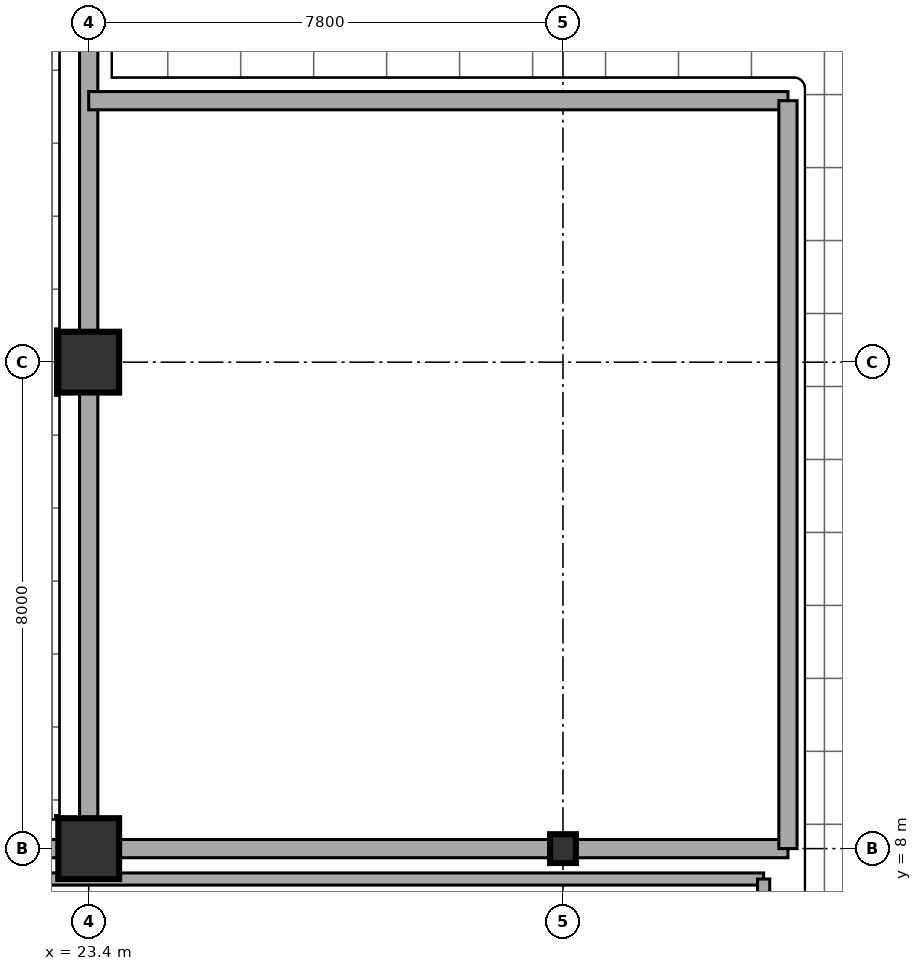
"""IFC4 building model, lengths in metres.
Left out: names, types, materials, properties, quantities, classifications, styles, units other than length and angle.
Written with IfcOpenShell. Run it as: python <this file> out.ifc"""

import sys

from ifc_helpers import new_model, si_unit, direction, frame, frame_2d, origin, origin_2d, place, context, subcontext, project, spatial, rectangle, i_section, extrude, element, fill, save


model = new_model("IFC4")
c1 = context("Model", 3, precision=1e-05, world=origin(), true_north=direction((0.0, 1.0)))
c2 = subcontext(c1, "Body", "Model", "MODEL_VIEW")
j1 = project(units=[si_unit("LENGTHUNIT", "METRE"), si_unit("PLANEANGLEUNIT", "RADIAN")], contexts=[c1])
p1 = place(None, origin())
s1 = spatial("IfcSite", under=j1, at=p1, CompositionType="ELEMENT")
p2 = place(p1, origin())
s2 = spatial("IfcBuilding", under=s1, at=p2, CompositionType="ELEMENT")
p3 = place(p2, origin())
s3 = spatial("IfcBuildingStorey", under=s2, at=p3, CompositionType="ELEMENT", Elevation=0.0)
for number, where, z_axis, x_axis in (
    (1, (23.4, 8.0, 0.0), (0.0, 0.0, 1.0), (1.0, 0.0, 0.0)),
    (2, (23.4, 16.0, 0.0), (0.0, 0.0, 1.0), (1.0, 0.0, 0.0)),
):
    element("IfcColumn", number, at=place(p3, frame(where, z_axis=z_axis, x_axis=x_axis)), inside=s3, PredefinedType="COLUMN", context=c2, shape_type="SweptSolid", body=[
        extrude(rectangle(XDim=1.0, YDim=1.0, at=origin_2d()), origin(), (0.0, 0.0, 1.0), 5.395),
    ])
p4 = place(p3, frame((31.2, 8.0, 0.0), z_axis=(0.0, 0.0, 1.0), x_axis=(1.0, 0.0, 0.0)))
e3 = element("IfcColumn", 3, at=p4, inside=s3, PredefinedType="COLUMN", context=c2, shape_type="SweptSolid", body=[
    extrude(i_section(OverallWidth=0.424, OverallDepth=0.474, WebThickness=0.048, FlangeThickness=0.077, at=origin_2d()), origin(), (0.0, 0.0, 1.0), 5.395),
])
p5 = place(p3, frame((23.4, 8.0, 0.0), z_axis=(0.0, 0.0, 1.0), x_axis=(0.0, 1.0, 0.0)))
e4 = element("IfcWall", 4, at=p5, inside=s3, PredefinedType="PARTITIONING", context=c2, shape_type="SweptSolid", body=[
    extrude(rectangle(XDim=16.0, YDim=0.3, at=frame_2d((8.0, 0.0))), origin(), (0.0, 0.0, 1.0), 3.688),
])
p6 = place(p5, frame((12.8, 0.0, 0.0)))
e5 = element("IfcOpeningElement", 5, at=p6, cuts=e4, PredefinedType="OPENING", context=c2, shape_type="SweptSolid", body=[
    extrude(rectangle(XDim=1.8, YDim=2.4, at=frame_2d((0.9, 1.2))), frame((0.0, 0.16, 0.0), z_axis=(0.0, -1.0, 0.0), x_axis=(1.0, 0.0, 0.0)), (0.0, 0.0, 1.0), 0.32),
])
p7 = place(p3, frame((0.15, 8.0, 0.0), z_axis=(0.0, 0.0, 1.0), x_axis=(1.0, 0.0, 0.0)))
e6 = element("IfcWall", 6, at=p7, inside=s3, PredefinedType="PARTITIONING", context=c2, shape_type="SweptSolid", body=[
    extrude(rectangle(XDim=23.25, YDim=0.3, at=frame_2d((11.625, 0.0))), origin(), (0.0, 0.0, 1.0), 3.688),
])
p8 = place(p7, frame((3.2, 0.0, 0.0)))
e7 = element("IfcOpeningElement", 7, at=p8, cuts=e6, PredefinedType="OPENING", context=c2, shape_type="SweptSolid", body=[
    extrude(rectangle(XDim=0.95, YDim=2.15, at=frame_2d((0.475, 1.075))), frame((0.0, 0.16, 0.0), z_axis=(0.0, -1.0, 0.0), x_axis=(1.0, 0.0, 0.0)), (0.0, 0.0, 1.0), 0.32),
])
p9 = place(p3, frame((23.4, 20.3, 0.0), z_axis=(0.0, 0.0, 1.0), x_axis=(1.0, 0.0, 0.0)))
e8 = element("IfcWall", 8, at=p9, inside=s3, PredefinedType="PARTITIONING", context=c2, shape_type="SweptSolid", body=[
    extrude(rectangle(XDim=11.5, YDim=0.3, at=frame_2d((5.75, 0.0))), origin(), (0.0, 0.0, 1.0), 3.688),
])
p10 = place(p9, frame((2.2, 0.0, 0.0)))
e9 = element("IfcOpeningElement", 9, at=p10, cuts=e8, PredefinedType="OPENING", context=c2, shape_type="SweptSolid", body=[
    extrude(rectangle(XDim=1.8, YDim=2.4, at=frame_2d((0.9, 1.2))), frame((0.0, 0.16, 0.0), z_axis=(0.0, -1.0, 0.0), x_axis=(1.0, 0.0, 0.0)), (0.0, 0.0, 1.0), 0.32),
])
p11 = place(p9, frame((8.4, 0.0, 0.0)))
e10 = element("IfcOpeningElement", 10, at=p11, cuts=e8, PredefinedType="OPENING", context=c2, shape_type="SweptSolid", body=[
    extrude(rectangle(XDim=1.6, YDim=2.4, at=frame_2d((0.8, 1.2))), frame((0.0, 0.16, 0.0), z_axis=(0.0, -1.0, 0.0), x_axis=(1.0, 0.0, 0.0)), (0.0, 0.0, 1.0), 0.32),
])
p12 = place(p3, frame((23.4, 8.0, 0.0), z_axis=(0.0, 0.0, 1.0), x_axis=(1.0, 0.0, 0.0)))
e11 = element("IfcWall", 11, at=p12, inside=s3, PredefinedType="PARTITIONING", context=c2, shape_type="SweptSolid", body=[
    extrude(rectangle(XDim=11.5, YDim=0.3, at=frame_2d((5.75, 0.0))), origin(), (0.0, 0.0, 1.0), 3.688),
])
p13 = place(p3, frame((34.9, 8.0, 0.0), z_axis=(0.0, 0.0, 1.0), x_axis=(0.0, 1.0, 0.0)))
e12 = element("IfcWall", 12, at=p13, inside=s3, PredefinedType="PARTITIONING", context=c2, shape_type="SweptSolid", body=[
    extrude(rectangle(XDim=12.3, YDim=0.3, at=frame_2d((6.15, 0.0))), origin(), (0.0, 0.0, 1.0), 3.688),
])
p14 = place(p13, frame((4.2, 0.0, 0.0)))
e13 = element("IfcOpeningElement", 13, at=p14, cuts=e12, PredefinedType="OPENING", context=c2, shape_type="SweptSolid", body=[
    extrude(rectangle(XDim=1.05, YDim=2.15, at=frame_2d((0.525, 1.075))), frame((0.0, 0.16, 0.0), z_axis=(0.0, -1.0, 0.0), x_axis=(1.0, 0.0, 0.0)), (0.0, 0.0, 1.0), 0.32),
])
p15 = place(p3, frame((7.8, 7.5, 0.0), z_axis=(0.0, 0.0, 1.0), x_axis=(1.0, 0.0, 0.0)))
e14 = element("IfcWall", 14, at=p15, inside=s3, PredefinedType="SOLIDWALL", context=c2, shape_type="SweptSolid", body=[
    extrude(rectangle(XDim=26.7, YDim=0.2, at=frame_2d((13.35, 0.0))), origin(), (0.0, 0.0, 1.0), 4.415),
])
p16 = place(p3, frame((34.5, 1.3, 0.0), z_axis=(0.0, 0.0, 1.0), x_axis=(0.0, 1.0, 0.0)))
e15 = element("IfcWall", 15, at=p16, inside=s3, PredefinedType="SOLIDWALL", context=c2, shape_type="SweptSolid", body=[
    extrude(rectangle(XDim=6.2, YDim=0.2, at=frame_2d((3.1, 0.0))), origin(), (0.0, 0.0, 1.0), 4.701),
])
p17 = place(p6, origin())
e16 = element("IfcDoor", 16, at=p17, inside=s3, OperationType="SINGLE_SWING_LEFT", PredefinedType="DOOR", context=c2, shape_type="SweptSolid", body=[
    extrude(rectangle(XDim=1.8, YDim=2.4, at=frame_2d((0.9, 1.2))), frame((0.0, 0.025, 0.0), z_axis=(0.0, -1.0, 0.0), x_axis=(1.0, 0.0, 0.0)), (0.0, 0.0, 1.0), 0.05),
])
fill(e5, e16)
p18 = place(p10, origin())
e17 = element("IfcDoor", 17, at=p18, inside=s3, OperationType="SINGLE_SWING_LEFT", PredefinedType="DOOR", context=c2, shape_type="SweptSolid", body=[
    extrude(rectangle(XDim=1.8, YDim=2.4, at=frame_2d((0.9, 1.2))), frame((0.0, 0.025, 0.0), z_axis=(0.0, -1.0, 0.0), x_axis=(1.0, 0.0, 0.0)), (0.0, 0.0, 1.0), 0.05),
])
fill(e9, e17)
p19 = place(p11, origin())
e18 = element("IfcDoor", 18, at=p19, inside=s3, OperationType="SINGLE_SWING_LEFT", PredefinedType="DOOR", context=c2, shape_type="SweptSolid", body=[
    extrude(rectangle(XDim=1.6, YDim=2.4, at=frame_2d((0.8, 1.2))), frame((0.0, 0.025, 0.0), z_axis=(0.0, -1.0, 0.0), x_axis=(1.0, 0.0, 0.0)), (0.0, 0.0, 1.0), 0.05),
])
fill(e10, e18)
p20 = place(p14, origin())
e19 = element("IfcDoor", 19, at=p20, inside=s3, OperationType="SINGLE_SWING_LEFT", PredefinedType="DOOR", context=c2, shape_type="SweptSolid", body=[
    extrude(rectangle(XDim=1.05, YDim=2.15, at=frame_2d((0.525, 1.075))), frame((0.0, 0.025, 0.0), z_axis=(0.0, -1.0, 0.0), x_axis=(1.0, 0.0, 0.0)), (0.0, 0.0, 1.0), 0.05),
])
fill(e13, e19)
save(model, sys.argv[1])
